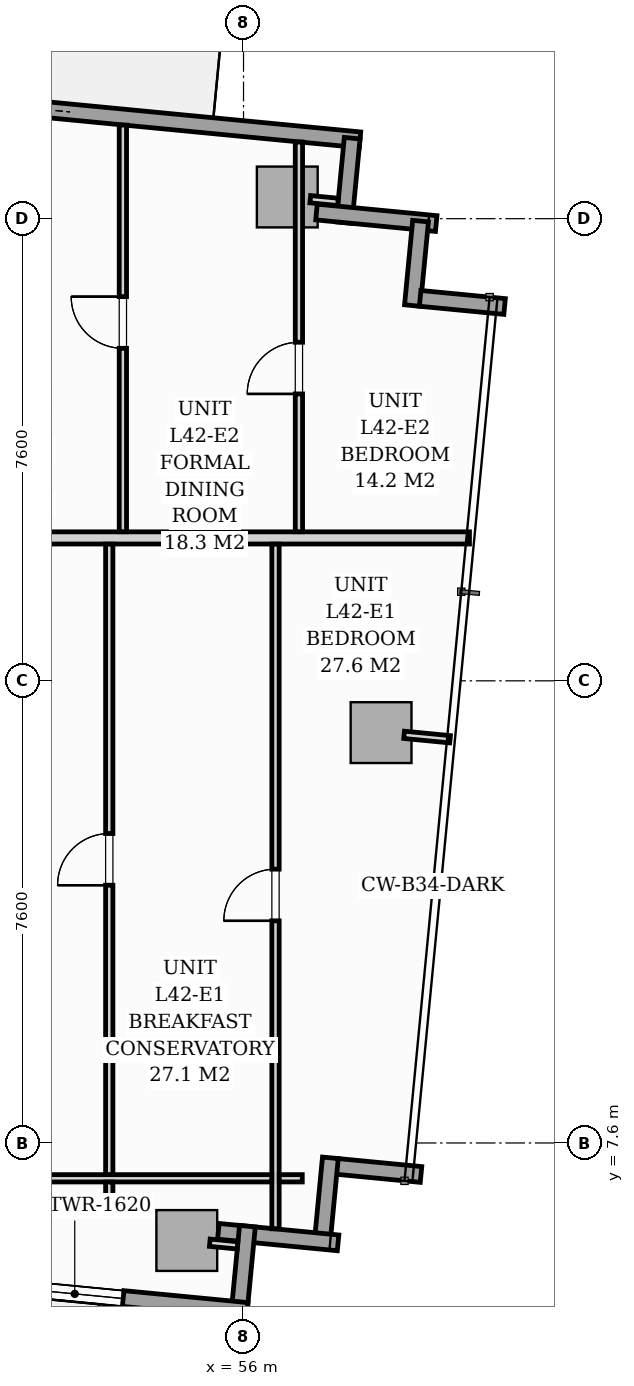
"""IFC4 building model, lengths in metres.
Left out: names, types, materials, properties, quantities, classifications, styles, units other than length and angle.
Written with IfcOpenShell. Run it as: python <this file> out.ifc"""

import sys

from ifc_helpers import new_model, si_unit, direction, frame, frame_2d, origin, origin_2d, place, context, subcontext, project, spatial, rectangle, extrude, source, transform, mapped, element, fill, save


model = new_model("IFC4")
c1 = context("Model", 3, precision=1e-05, world=origin(), true_north=direction((0.0, 1.0)))
c2 = subcontext(c1, "Body", "Model", "MODEL_VIEW")
j1 = project(units=[si_unit("LENGTHUNIT", "METRE"), si_unit("PLANEANGLEUNIT", "RADIAN")], contexts=[c1])
p1 = place(None, origin())
s1 = spatial("IfcSite", under=j1, at=p1, CompositionType="ELEMENT")
p2 = place(p1, origin())
s2 = spatial("IfcBuilding", under=s1, at=p2, CompositionType="ELEMENT")
p3 = place(p2, frame((0.0, 0.0, 147.0)))
s3 = spatial("IfcBuildingStorey", under=s2, at=p3, CompositionType="ELEMENT", Elevation=147.0)
m1 = source(origin(), c2, "Body", "SweptSolid", [
    extrude(rectangle(XDim=1.0, YDim=1.0, at=origin_2d()), origin(), (0.0, 0.0, 1.0), 3.196),
])
for number, where, z_axis, x_axis in (
    (1, (55.067, 5.996, 0.002), (0.0, 0.0, 1.0), (0.995, -0.096, 0.0)),
    (2, (56.719, 23.157, 0.002), (0.0, 0.0, 1.0), (0.995, -0.096, 0.0)),
    (3, (58.262, 14.348, 0.002), (0.0, 0.0, 1.0), (0.995, -0.096, 0.0)),
):
    element("IfcColumn", number, at=place(p3, frame(where, z_axis=z_axis, x_axis=x_axis)), inside=s3, PredefinedType="COLUMN", context=c2, shape_type="MappedRepresentation", body=[
        mapped(m1, transform((0.0, 0.0, 0.0), scale=1.0)),
    ])
p4 = place(p3, frame((40.983, 25.727, 0.0), z_axis=(0.0, 0.0, 1.0), x_axis=(0.995395844771, -0.095849424686, 0.0)))
e4 = element("IfcWall", 4, at=p4, inside=s3, PredefinedType="STANDARD", context=c2, shape_type="SweptSolid", body=[
    extrude(rectangle(XDim=17.01, YDim=0.26, at=frame_2d((8.505, 0.0))), origin(), (0.0, 0.0, 1.0), 2.94),
])
p5 = place(p4, frame((9.61, 0.0, 0.0)))
e5 = element("IfcOpeningElement", 5, at=p5, cuts=e4, PredefinedType="OPENING", context=c2, shape_type="SweptSolid", body=[
    extrude(rectangle(XDim=1.8, YDim=2.06, at=frame_2d((0.9, 1.03))), frame((0.0, 0.14, 0.0), z_axis=(0.0, -1.0, 0.0), x_axis=(1.0, 0.0, 0.0)), (0.0, 0.0, 1.0), 0.28),
])
p6 = place(p4, frame((0.7, 0.0, 0.65)))
e6 = element("IfcOpeningElement", 6, at=p6, cuts=e4, PredefinedType="OPENING", context=c2, shape_type="SweptSolid", body=[
    extrude(rectangle(XDim=1.6, YDim=1.5, at=frame_2d((0.8, 0.75))), frame((0.0, 0.14, 0.0), z_axis=(0.0, -1.0, 0.0), x_axis=(1.0, 0.0, 0.0)), (0.0, 0.0, 1.0), 0.28),
])
p7 = place(p3, frame((57.787, 24.124, 0.0), z_axis=(0.0, 0.0, 1.0), x_axis=(-0.095915846097, -0.995389446633, 0.0)))
e7 = element("IfcWall", 7, at=p7, inside=s3, PredefinedType="STANDARD", context=c2, shape_type="SweptSolid", body=[
    extrude(rectangle(XDim=1.395, YDim=0.26, at=frame_2d((0.697, 0.0))), origin(), (0.0, 0.0, 1.0), 2.94),
])
p8 = place(p3, frame((57.2, 22.909, 0.0), z_axis=(0.0, 0.0, 1.0), x_axis=(0.995401789159, -0.095787672171, 0.0)))
e8 = element("IfcWall", 8, at=p8, inside=s3, PredefinedType="STANDARD", context=c2, shape_type="SweptSolid", body=[
    extrude(rectangle(XDim=1.978, YDim=0.26, at=frame_2d((0.989, 0.0))), origin(), (0.0, 0.0, 1.0), 2.94),
])
for number, where, z_axis, x_axis in (
    (9, (58.912, 22.76, 0.0), (0.0, 0.0, 1.0), (-0.096, -0.995, 0.0)),
    (10, (58.905, 21.49, 0.0), (0.0, 0.0, 1.0), (0.995, -0.096, 0.0)),
):
    element("IfcWall", number, at=place(p3, frame(where, z_axis=z_axis, x_axis=x_axis)), inside=s3, PredefinedType="STANDARD", context=c2, shape_type="SweptSolid", body=[
        extrude(rectangle(XDim=1.395, YDim=0.26, at=frame_2d((0.698, 0.0))), origin(), (0.0, 0.0, 1.0), 2.94),
    ])
for number, where, z_axis, x_axis in (
    (11, (58.919, 7.082, 0.0), (0.0, 0.0, 1.0), (-0.995, 0.096, 0.0)),
    (12, (57.428, 7.356, 0.0), (0.0, 0.0, 1.0), (-0.096, -0.995, 0.0)),
):
    element("IfcWall", number, at=place(p3, frame(where, z_axis=z_axis, x_axis=x_axis)), inside=s3, PredefinedType="STANDARD", context=c2, shape_type="SweptSolid", body=[
        extrude(rectangle(XDim=1.395, YDim=0.26, at=frame_2d((0.697, 0.0))), origin(), (0.0, 0.0, 1.0), 2.94),
    ])
p9 = place(p3, frame((57.555, 5.958, 0.0), z_axis=(0.0, 0.0, 1.0), x_axis=(-0.995401789159, 0.095787672171, 0.0)))
e13 = element("IfcWall", 13, at=p9, inside=s3, PredefinedType="STANDARD", context=c2, shape_type="SweptSolid", body=[
    extrude(rectangle(XDim=1.978, YDim=0.26, at=frame_2d((0.989, 0.0))), origin(), (0.0, 0.0, 1.0), 2.94),
])
p10 = place(p3, frame((56.064, 6.232, 0.0), z_axis=(0.0, 0.0, 1.0), x_axis=(-0.09589913835, -0.995391056452, 0.0)))
e14 = element("IfcWall", 14, at=p10, inside=s3, PredefinedType="STANDARD", context=c2, shape_type="SweptSolid", body=[
    extrude(rectangle(XDim=1.395, YDim=0.26, at=frame_2d((0.698, 0.0))), origin(), (0.0, 0.0, 1.0), 2.94),
])
p11 = place(p3, frame((56.061, 4.845, 0.0), z_axis=(0.0, 0.0, 1.0), x_axis=(-0.995395976631, 0.095848055311, 0.0)))
e15 = element("IfcWall", 15, at=p11, inside=s3, PredefinedType="STANDARD", context=c2, shape_type="SweptSolid", body=[
    extrude(rectangle(XDim=17.01, YDim=0.26, at=frame_2d((8.505, 0.0))), origin(), (0.0, 0.0, 1.0), 2.94),
])
p12 = place(p11, frame((8.794, 0.0, 0.0)))
e16 = element("IfcOpeningElement", 16, at=p12, cuts=e15, PredefinedType="OPENING", context=c2, shape_type="SweptSolid", body=[
    extrude(rectangle(XDim=1.8, YDim=2.06, at=frame_2d((0.9, 1.03))), frame((0.0, 0.14, 0.0), z_axis=(0.0, -1.0, 0.0), x_axis=(1.0, 0.0, 0.0)), (0.0, 0.0, 1.0), 0.28),
])
p13 = place(p11, frame((2.05, 0.0, 0.65)))
e17 = element("IfcOpeningElement", 17, at=p13, cuts=e15, PredefinedType="OPENING", context=c2, shape_type="SweptSolid", body=[
    extrude(rectangle(XDim=1.6, YDim=1.5, at=frame_2d((0.8, 0.75))), frame((0.0, 0.14, 0.0), z_axis=(0.0, -1.0, 0.0), x_axis=(1.0, 0.0, 0.0)), (0.0, 0.0, 1.0), 0.28),
])
p14 = place(p3, frame((47.782, 17.55, 0.0), z_axis=(0.0, 0.0, 1.0), x_axis=(1.0, 0.0, 0.0)))
e18 = element("IfcWall", 18, at=p14, inside=s3, PredefinedType="PARTITIONING", context=c2, shape_type="SweptSolid", body=[
    extrude(rectangle(XDim=11.934, YDim=0.2, at=frame_2d((5.967, 0.0))), origin(), (0.0, 0.0, 1.0), 2.94),
])
p15 = place(p3, frame((56.526, 6.189, 0.0), z_axis=(0.0, 0.0, 1.0), x_axis=(0.0, 1.0, 0.0)))
e19 = element("IfcWall", 19, at=p15, inside=s3, PredefinedType="PARTITIONING", context=c2, shape_type="SweptSolid", body=[
    extrude(rectangle(XDim=11.259, YDim=0.12, at=frame_2d((5.629, 0.0))), origin(), (0.0, 0.0, 1.0), 2.94),
])
p16 = place(p15, frame((5.064, 0.0, 0.0)))
e20 = element("IfcOpeningElement", 20, at=p16, cuts=e19, PredefinedType="OPENING", context=c2, shape_type="SweptSolid", body=[
    extrude(rectangle(XDim=0.85, YDim=2.05, at=frame_2d((0.425, 1.025))), frame((0.0, 0.07, 0.0), z_axis=(0.0, -1.0, 0.0), x_axis=(1.0, 0.0, 0.0)), (0.0, 0.0, 1.0), 0.14),
])
p17 = place(p3, frame((47.782, 7.019, 0.0), z_axis=(0.0, 0.0, 1.0), x_axis=(1.0, 0.0, 0.0)))
e21 = element("IfcWall", 21, at=p17, inside=s3, PredefinedType="PARTITIONING", context=c2, shape_type="SweptSolid", body=[
    extrude(rectangle(XDim=8.682, YDim=0.12, at=frame_2d((4.341, 0.0))), origin(), (0.0, 0.0, 1.0), 2.94),
])
p18 = place(p17, frame((3.916, 0.0, 0.0)))
e22 = element("IfcOpeningElement", 22, at=p18, cuts=e21, PredefinedType="OPENING", context=c2, shape_type="SweptSolid", body=[
    extrude(rectangle(XDim=0.85, YDim=2.05, at=frame_2d((0.425, 1.025))), frame((0.0, 0.07, 0.0), z_axis=(0.0, -1.0, 0.0), x_axis=(1.0, 0.0, 0.0)), (0.0, 0.0, 1.0), 0.14),
])
p19 = place(p3, frame((56.588, 7.019, 0.0), z_axis=(0.0, 0.0, 1.0), x_axis=(1.0, 0.0, 0.0)))
e23 = element("IfcWall", 23, at=p19, inside=s3, PredefinedType="PARTITIONING", context=c2, shape_type="SweptSolid", body=[
    extrude(rectangle(XDim=0.378, YDim=0.12, at=frame_2d((0.189, 0.0))), origin(), (0.0, 0.0, 1.0), 2.94),
])
p20 = place(p3, frame((53.792, 6.579, 0.0), z_axis=(0.0, 0.0, 1.0), x_axis=(0.0, 1.0, 0.0)))
e24 = element("IfcWall", 24, at=p20, inside=s3, PredefinedType="PARTITIONING", context=c2, shape_type="SweptSolid", body=[
    extrude(rectangle(XDim=0.378, YDim=0.12, at=frame_2d((0.189, 0.0))), origin(), (0.0, 0.0, 1.0), 2.94),
])
p21 = place(p3, frame((53.792, 7.081, 0.0), z_axis=(0.0, 0.0, 1.0), x_axis=(0.0, 1.0, 0.0)))
e25 = element("IfcWall", 25, at=p21, inside=s3, PredefinedType="PARTITIONING", context=c2, shape_type="SweptSolid", body=[
    extrude(rectangle(XDim=10.367, YDim=0.12, at=frame_2d((5.184, 0.0))), origin(), (0.0, 0.0, 1.0), 2.94),
])
p22 = place(p21, frame((4.758, 0.0, 0.0)))
e26 = element("IfcOpeningElement", 26, at=p22, cuts=e25, PredefinedType="OPENING", context=c2, shape_type="SweptSolid", body=[
    extrude(rectangle(XDim=0.85, YDim=2.05, at=frame_2d((0.425, 1.025))), frame((0.0, 0.07, 0.0), z_axis=(0.0, -1.0, 0.0), x_axis=(1.0, 0.0, 0.0)), (0.0, 0.0, 1.0), 0.14),
])
p23 = place(p3, frame((56.911, 17.652, 0.0), z_axis=(0.0, 0.0, 1.0), x_axis=(0.0, 1.0, 0.0)))
e27 = element("IfcWall", 27, at=p23, inside=s3, PredefinedType="PARTITIONING", context=c2, shape_type="SweptSolid", body=[
    extrude(rectangle(XDim=6.408, YDim=0.12, at=frame_2d((3.204, 0.0))), origin(), (0.0, 0.0, 1.0), 2.383),
])
p24 = place(p23, frame((2.266, 0.0, 0.0)))
e28 = element("IfcOpeningElement", 28, at=p24, cuts=e27, PredefinedType="OPENING", context=c2, shape_type="SweptSolid", body=[
    extrude(rectangle(XDim=0.85, YDim=2.05, at=frame_2d((0.425, 1.025))), frame((0.0, 0.07, 0.0), z_axis=(0.0, -1.0, 0.0), x_axis=(1.0, 0.0, 0.0)), (0.0, 0.0, 1.0), 0.14),
])
p25 = place(p3, frame((54.016, 17.652, 0.0), z_axis=(0.0, 0.0, 1.0), x_axis=(0.0, 1.0, 0.0)))
e29 = element("IfcWall", 29, at=p25, inside=s3, PredefinedType="PARTITIONING", context=c2, shape_type="SweptSolid", body=[
    extrude(rectangle(XDim=6.687, YDim=0.12, at=frame_2d((3.344, 0.0))), origin(), (0.0, 0.0, 1.0), 2.94),
])
p26 = place(p25, frame((3.016, 0.0, 0.0)))
e30 = element("IfcOpeningElement", 30, at=p26, cuts=e29, PredefinedType="OPENING", context=c2, shape_type="SweptSolid", body=[
    extrude(rectangle(XDim=0.85, YDim=2.05, at=frame_2d((0.425, 1.025))), frame((0.0, 0.07, 0.0), z_axis=(0.0, -1.0, 0.0), x_axis=(1.0, 0.0, 0.0)), (0.0, 0.0, 1.0), 0.14),
])
for number, where, z_axis, x_axis in (
    (31, (55.445, 5.96, 0.0), (0.0, 0.0, 1.0), (0.995, -0.096, 0.0)),
    (32, (57.098, 23.12, 0.0), (0.0, 0.0, 1.0), (0.995, -0.096, 0.0)),
):
    element("IfcWall", number, at=place(p3, frame(where, z_axis=z_axis, x_axis=x_axis)), inside=s3, PredefinedType="PARTITIONING", context=c2, shape_type="SweptSolid", body=[
        extrude(rectangle(XDim=0.458, YDim=0.12, at=frame_2d((0.229, 0.0))), origin(), (0.0, 0.0, 1.0), 2.94),
    ])
p27 = place(p3, frame((58.64, 14.312, 0.0), z_axis=(0.0, 0.0, 1.0), x_axis=(0.995377786728, -0.096036772582, 0.0)))
e33 = element("IfcWall", 33, at=p27, inside=s3, PredefinedType="PARTITIONING", context=c2, shape_type="SweptSolid", body=[
    extrude(rectangle(XDim=0.76, YDim=0.12, at=frame_2d((0.38, 0.0))), origin(), (0.0, 0.0, 1.0), 2.94),
])
m2 = source(origin(), c2, "Body", "SweptSolid", [
    extrude(rectangle(XDim=1.6, YDim=1.5, at=frame_2d((0.8, 0.75))), frame((0.0, 0.03, 0.0), z_axis=(0.0, -1.0, 0.0), x_axis=(1.0, 0.0, 0.0)), (0.0, 0.0, 1.0), 0.06),
])
p28 = place(p13, origin())
e34 = element("IfcWindow", 34, at=p28, inside=s3, PartitioningType="SINGLE_PANEL", PredefinedType="WINDOW", context=c2, shape_type="MappedRepresentation", body=[
    mapped(m2, transform((0.0, 0.0, 0.0), scale=1.0)),
])
fill(e17, e34)
m3 = source(origin(), c2, "Body", "SweptSolid", [
    extrude(rectangle(XDim=0.85, YDim=2.05, at=frame_2d((0.425, 1.025))), frame((0.0, 0.025, 0.0), z_axis=(0.0, -1.0, 0.0), x_axis=(1.0, 0.0, 0.0)), (0.0, 0.0, 1.0), 0.05),
])
p29 = place(p16, origin())
e35 = element("IfcDoor", 35, at=p29, inside=s3, OperationType="SINGLE_SWING_LEFT", PredefinedType="DOOR", context=c2, shape_type="MappedRepresentation", body=[
    mapped(m3, transform((0.0, 0.0, 0.0), scale=1.0)),
])
fill(e20, e35)
p30 = place(p22, origin())
e36 = element("IfcDoor", 36, at=p30, inside=s3, OperationType="SINGLE_SWING_LEFT", PredefinedType="DOOR", context=c2, shape_type="MappedRepresentation", body=[
    mapped(m3, transform((0.0, 0.0, 0.0), scale=1.0)),
])
fill(e26, e36)
p31 = place(p24, origin())
e37 = element("IfcDoor", 37, at=p31, inside=s3, OperationType="SINGLE_SWING_LEFT", PredefinedType="DOOR", context=c2, shape_type="MappedRepresentation", body=[
    mapped(m3, transform((0.0, 0.0, 0.0), scale=1.0)),
])
fill(e28, e37)
p32 = place(p26, origin())
e38 = element("IfcDoor", 38, at=p32, inside=s3, OperationType="SINGLE_SWING_RIGHT", PredefinedType="DOOR", context=c2, shape_type="MappedRepresentation", body=[
    mapped(m3, transform((0.0, 0.0, 0.0), scale=1.0)),
])
fill(e30, e38)
save(model, sys.argv[1])
